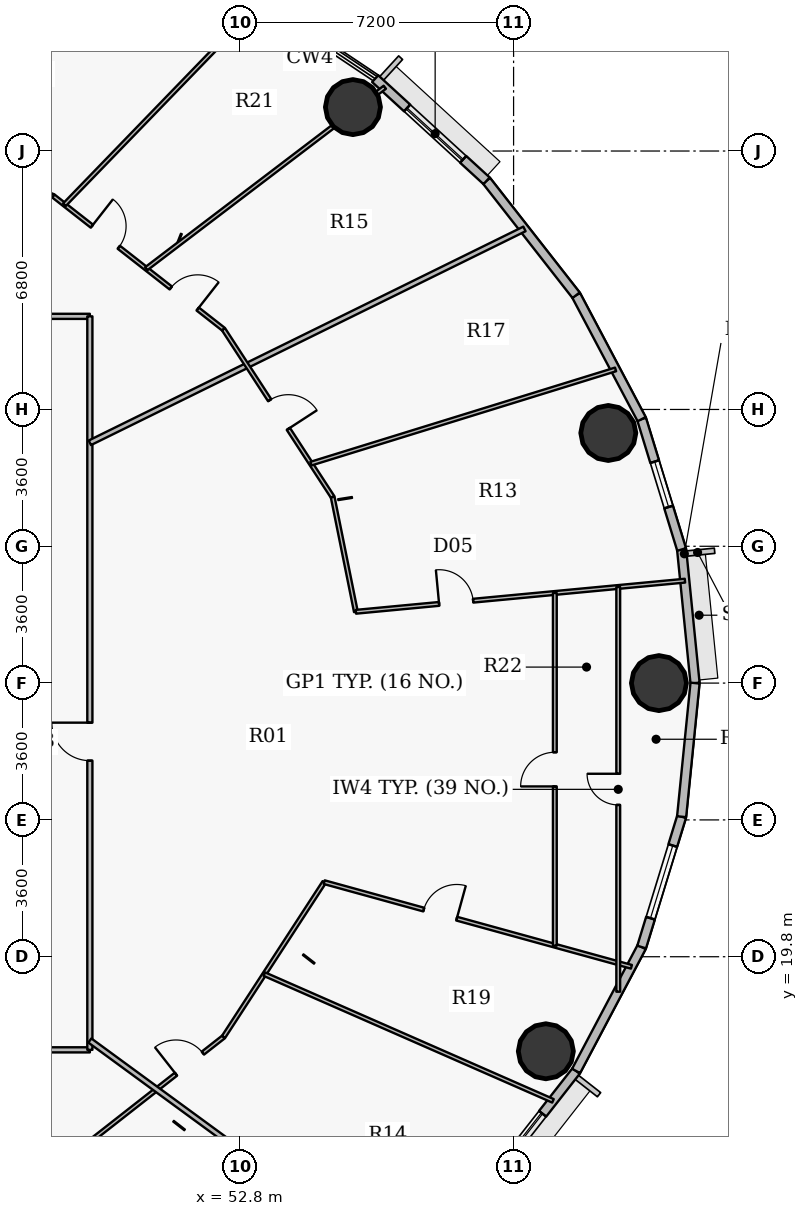
"""IFC4 building model, lengths in metres.
Left out: names, types, materials, properties, quantities, classifications, styles, units other than length and angle.
Written with IfcOpenShell. Run it as: python <this file> out.ifc"""

import sys

from ifc_helpers import new_model, si_unit, direction, frame, frame_2d, origin, origin_2d, place, context, subcontext, project, spatial, rectangle, hollow_circle, extrude, source, transform, mapped, element, fill, save


model = new_model("IFC4")
c1 = context("Model", 3, precision=1e-05, world=origin(), true_north=direction((0.0, 1.0)))
c2 = subcontext(c1, "Body", "Model", "MODEL_VIEW")
j1 = project(units=[si_unit("LENGTHUNIT", "METRE"), si_unit("PLANEANGLEUNIT", "RADIAN")], contexts=[c1])
p1 = place(None, origin())
s1 = spatial("IfcSite", under=j1, at=p1, CompositionType="ELEMENT")
p2 = place(p1, origin())
s2 = spatial("IfcBuilding", under=s1, at=p2, CompositionType="ELEMENT")
p3 = place(p2, frame((0.0, 0.0, 134.7)))
s3 = spatial("IfcBuildingStorey", under=s2, at=p3, CompositionType="ELEMENT", Elevation=134.7)
for number, where, z_axis, x_axis in (
    (1, (63.825, 27.0, 0.0), (0.0, 0.0, 1.0), (1.0, 0.0, 0.0)),
    (2, (62.493, 33.581, 0.0), (0.0, 0.0, 1.0), (1.0, 0.0, 0.0)),
    (3, (55.773, 42.156, 0.0), (0.0, 0.0, 1.0), (1.0, 0.0, 0.0)),
    (4, (60.849, 17.312, 0.0), (0.0, 0.0, 1.0), (1.0, 0.0, 0.0)),
):
    element("IfcColumn", number, at=place(p3, frame(where, z_axis=z_axis, x_axis=x_axis)), inside=s3, PredefinedType="COLUMN", context=c2, shape_type="SweptSolid", body=[
        extrude(hollow_circle(Radius=0.725, WallThickness=0.042, at=origin_2d()), origin(), (0.0, 0.0, 1.0), 3.75),
    ])
p4 = place(p3, frame((64.422, 30.515, 0.0), z_axis=(0.0, 0.0, 1.0), x_axis=(0.099989468229, -0.994988495533, 0.0)))
e5 = element("IfcWall", 5, at=p4, inside=s3, PredefinedType="SOLIDWALL", context=c2, shape_type="SweptSolid", body=[
    extrude(rectangle(XDim=3.533, YDim=0.24, at=frame_2d((1.767, 0.0))), origin(), (0.0, 0.0, 1.0), 3.5),
])
p5 = place(p3, frame((63.37, 33.945, 0.0), z_axis=(0.0, 0.0, 1.0), x_axis=(0.293124431344, -0.956074300329, 0.0)))
e6 = element("IfcWall", 6, at=p5, inside=s3, PredefinedType="SOLIDWALL", context=c2, shape_type="SweptSolid", body=[
    extrude(rectangle(XDim=3.587, YDim=0.24, at=frame_2d((1.793, 0.0))), origin(), (0.0, 0.0, 1.0), 3.5),
])
p6 = place(p5, frame((1.169, 0.0, 0.9)))
e7 = element("IfcOpeningElement", 7, at=p6, cuts=e6, PredefinedType="OPENING", context=c2, shape_type="SweptSolid", body=[
    extrude(rectangle(XDim=1.25, YDim=1.65, at=origin_2d()), frame((0.625, 0.13, 0.825), z_axis=(0.0, -1.0, 0.0), x_axis=(1.0, 0.0, 0.0)), (0.0, 0.0, 1.0), 0.26),
])
p7 = place(p3, frame((61.645, 37.206, 0.0), z_axis=(0.0, 0.0, 1.0), x_axis=(0.467614004126, -0.883932770716, 0.0)))
e8 = element("IfcWall", 8, at=p7, inside=s3, PredefinedType="SOLIDWALL", context=c2, shape_type="SweptSolid", body=[
    extrude(rectangle(XDim=3.689, YDim=0.24, at=frame_2d((1.844, 0.0))), origin(), (0.0, 0.0, 1.0), 3.5),
])
p8 = place(p3, frame((59.289, 40.217, 0.0), z_axis=(0.0, 0.0, 1.0), x_axis=(0.616272103517, -0.787533297345, 0.0)))
e9 = element("IfcWall", 9, at=p8, inside=s3, PredefinedType="SOLIDWALL", context=c2, shape_type="SweptSolid", body=[
    extrude(rectangle(XDim=3.823, YDim=0.24, at=frame_2d((1.912, 0.0))), origin(), (0.0, 0.0, 1.0), 3.5),
])
p9 = place(p3, frame((56.358, 42.903, 0.0), z_axis=(0.0, 0.0, 1.0), x_axis=(0.737113356241, -0.675769117414, 0.0)))
e10 = element("IfcWall", 10, at=p9, inside=s3, PredefinedType="SOLIDWALL", context=c2, shape_type="SweptSolid", body=[
    extrude(rectangle(XDim=3.976, YDim=0.24, at=frame_2d((1.988, 0.0))), origin(), (0.0, 0.0, 1.0), 3.5),
])
p10 = place(p9, frame((1.141, 0.0, 0.9)))
e11 = element("IfcOpeningElement", 11, at=p10, cuts=e10, PredefinedType="OPENING", context=c2, shape_type="SweptSolid", body=[
    extrude(rectangle(XDim=2.0, YDim=1.75, at=origin_2d()), frame((1.0, 0.13, 0.875), z_axis=(0.0, -1.0, 0.0), x_axis=(1.0, 0.0, 0.0)), (0.0, 0.0, 1.0), 0.26),
])
p11 = place(p3, frame((61.645, 16.794, 0.0), z_axis=(0.0, 0.0, 1.0), x_axis=(-0.616272103517, -0.787533297345, 0.0)))
e12 = element("IfcWall", 12, at=p11, inside=s3, PredefinedType="SOLIDWALL", context=c2, shape_type="SweptSolid", body=[
    extrude(rectangle(XDim=3.823, YDim=0.24, at=frame_2d((1.912, 0.0))), origin(), (0.0, 0.0, 1.0), 3.5),
])
p12 = place(p11, frame((1.43, 0.0, 0.9)))
e13 = element("IfcOpeningElement", 13, at=p12, cuts=e12, PredefinedType="OPENING", context=c2, shape_type="SweptSolid", body=[
    extrude(rectangle(XDim=1.6, YDim=1.75, at=origin_2d()), frame((0.8, 0.13, 0.875), z_axis=(0.0, -1.0, 0.0), x_axis=(1.0, 0.0, 0.0)), (0.0, 0.0, 1.0), 0.26),
])
p13 = place(p3, frame((63.37, 20.055, 0.0), z_axis=(0.0, 0.0, 1.0), x_axis=(-0.467614004126, -0.883932770716, 0.0)))
e14 = element("IfcWall", 14, at=p13, inside=s3, PredefinedType="SOLIDWALL", context=c2, shape_type="SweptSolid", body=[
    extrude(rectangle(XDim=3.689, YDim=0.24, at=frame_2d((1.844, 0.0))), origin(), (0.0, 0.0, 1.0), 3.5),
])
p14 = place(p3, frame((64.422, 23.485, 0.0), z_axis=(0.0, 0.0, 1.0), x_axis=(-0.293124431344, -0.956074300329, 0.0)))
e15 = element("IfcWall", 15, at=p14, inside=s3, PredefinedType="SOLIDWALL", context=c2, shape_type="SweptSolid", body=[
    extrude(rectangle(XDim=3.587, YDim=0.24, at=frame_2d((1.793, 0.0))), origin(), (0.0, 0.0, 1.0), 3.5),
])
p15 = place(p14, frame((0.794, 0.0, 0.9)))
e16 = element("IfcOpeningElement", 16, at=p15, cuts=e15, PredefinedType="OPENING", context=c2, shape_type="SweptSolid", body=[
    extrude(rectangle(XDim=2.0, YDim=1.75, at=origin_2d()), frame((1.0, 0.13, 0.875), z_axis=(0.0, -1.0, 0.0), x_axis=(1.0, 0.0, 0.0)), (0.0, 0.0, 1.0), 0.26),
])
p16 = place(p3, frame((64.775, 27.0, 0.0), z_axis=(0.0, 0.0, 1.0), x_axis=(-0.099989468229, -0.994988495533, 0.0)))
e17 = element("IfcWall", 17, at=p16, inside=s3, PredefinedType="SOLIDWALL", context=c2, shape_type="SweptSolid", body=[
    extrude(rectangle(XDim=3.533, YDim=0.24, at=frame_2d((1.767, 0.0))), origin(), (0.0, 0.0, 1.0), 3.5),
])
p17 = place(p3, frame((36.774, 36.65, 0.0), z_axis=(0.0, 0.0, 1.0), x_axis=(1.0, 0.0, 0.0)))
e18 = element("IfcWall", 18, at=p17, inside=s3, PredefinedType="PARTITIONING", context=c2, shape_type="SweptSolid", body=[
    extrude(rectangle(XDim=12.076, YDim=0.135, at=frame_2d((6.038, 0.0))), origin(), (0.0, 0.0, 1.0), 2.935),
])
p18 = place(p17, frame((5.538, 0.0, 0.0)))
e19 = element("IfcOpeningElement", 19, at=p18, cuts=e18, PredefinedType="OPENING", context=c2, shape_type="SweptSolid", body=[
    extrude(rectangle(XDim=1.0, YDim=2.15, at=origin_2d()), frame((0.5, 0.078, 1.075), z_axis=(0.0, -1.0, 0.0), x_axis=(1.0, 0.0, 0.0)), (0.0, 0.0, 1.0), 0.155),
])
p19 = place(p3, frame((38.477, 17.35, 0.0), z_axis=(0.0, 0.0, 1.0), x_axis=(1.0, 0.0, 0.0)))
e20 = element("IfcWall", 20, at=p19, inside=s3, PredefinedType="PARTITIONING", context=c2, shape_type="SweptSolid", body=[
    extrude(rectangle(XDim=10.373, YDim=0.135, at=frame_2d((5.187, 0.0))), origin(), (0.0, 0.0, 1.0), 2.935),
])
p20 = place(p19, frame((4.687, 0.0, 0.0)))
e21 = element("IfcOpeningElement", 21, at=p20, cuts=e20, PredefinedType="OPENING", context=c2, shape_type="SweptSolid", body=[
    extrude(rectangle(XDim=1.0, YDim=2.15, at=origin_2d()), frame((0.5, 0.078, 1.075), z_axis=(0.0, -1.0, 0.0), x_axis=(1.0, 0.0, 0.0)), (0.0, 0.0, 1.0), 0.155),
])
p21 = place(p3, frame((42.724, 41.877, 0.0), z_axis=(0.0, 0.0, 1.0), x_axis=(0.928806258388, -0.370565695093, 0.0)))
e22 = element("IfcWall", 22, at=p21, inside=s3, PredefinedType="PARTITIONING", context=c2, shape_type="SweptSolid", body=[
    extrude(rectangle(XDim=5.562, YDim=0.1, at=frame_2d((2.781, 0.0))), origin(), (0.0, 0.0, 1.0), 2.935),
])
p22 = place(p3, frame((47.891, 14.184, 0.0), z_axis=(0.0, 0.0, 1.0), x_axis=(0.787333679705, 0.616527109544, 0.0)))
e23 = element("IfcWall", 23, at=p22, inside=s3, PredefinedType="PARTITIONING", context=c2, shape_type="SweptSolid", body=[
    extrude(rectangle(XDim=5.685, YDim=0.1, at=frame_2d((2.842, 0.0))), origin(), (0.0, 0.0, 1.0), 2.935),
])
p23 = place(p22, frame((4.096, 0.0, 0.0)))
e24 = element("IfcOpeningElement", 24, at=p23, cuts=e23, PredefinedType="OPENING", context=c2, shape_type="SweptSolid", body=[
    extrude(rectangle(XDim=0.9, YDim=2.1, at=origin_2d()), frame((0.45, 0.06, 1.05), z_axis=(0.0, -1.0, 0.0), x_axis=(1.0, 0.0, 0.0)), (0.0, 0.0, 1.0), 0.12),
])
p24 = place(p3, frame((47.891, 39.816, 0.0), z_axis=(0.0, 0.0, 1.0), x_axis=(0.787347250317, -0.61650977885, 0.0)))
e25 = element("IfcWall", 25, at=p24, inside=s3, PredefinedType="PARTITIONING", context=c2, shape_type="SweptSolid", body=[
    extrude(rectangle(XDim=5.683, YDim=0.1, at=frame_2d((2.842, 0.0))), origin(), (0.0, 0.0, 1.0), 2.935),
])
p25 = place(p24, frame((3.923, 0.0, 0.0)))
e26 = element("IfcOpeningElement", 26, at=p25, cuts=e25, PredefinedType="OPENING", context=c2, shape_type="SweptSolid", body=[
    extrude(rectangle(XDim=0.9, YDim=2.1, at=origin_2d()), frame((0.45, 0.06, 1.05), z_axis=(0.0, -1.0, 0.0), x_axis=(1.0, 0.0, 0.0)), (0.0, 0.0, 1.0), 0.12),
])
p26 = place(p24, frame((1.286, 0.0, 0.0)))
e27 = element("IfcOpeningElement", 27, at=p26, cuts=e25, PredefinedType="OPENING", context=c2, shape_type="SweptSolid", body=[
    extrude(rectangle(XDim=0.9, YDim=2.1, at=origin_2d()), frame((0.45, 0.06, 1.05), z_axis=(0.0, -1.0, 0.0), x_axis=(1.0, 0.0, 0.0)), (0.0, 0.0, 1.0), 0.12),
])
p27 = place(p3, frame((48.182, 39.588, 0.0), z_axis=(0.0, 0.0, 1.0), x_axis=(0.695422522839, 0.718601081775, 0.0)))
e28 = element("IfcWall", 28, at=p27, inside=s3, PredefinedType="PARTITIONING", context=c2, shape_type="SweptSolid", body=[
    extrude(rectangle(XDim=7.426, YDim=0.1, at=frame_2d((3.713, 0.0))), origin(), (0.0, 0.0, 1.0), 2.935),
])
p28 = place(p3, frame((48.85, 17.35, 0.0), z_axis=(0.0, 0.0, 1.0), x_axis=(0.0, 1.0, 0.0)))
e29 = element("IfcWall", 29, at=p28, inside=s3, PredefinedType="PARTITIONING", context=c2, shape_type="SweptSolid", body=[
    extrude(rectangle(XDim=19.3, YDim=0.135, at=frame_2d((9.65, 0.0))), origin(), (0.0, 0.0, 1.0), 2.935),
])
p29 = place(p28, frame((7.609, 0.0, 0.0)))
e30 = element("IfcOpeningElement", 30, at=p29, cuts=e29, PredefinedType="OPENING", context=c2, shape_type="SweptSolid", body=[
    extrude(rectangle(XDim=1.0, YDim=2.15, at=origin_2d()), frame((0.5, 0.078, 1.075), z_axis=(0.0, -1.0, 0.0), x_axis=(1.0, 0.0, 0.0)), (0.0, 0.0, 1.0), 0.155),
])
p30 = place(p3, frame((48.85, 17.595, 0.0), z_axis=(0.0, 0.0, 1.0), x_axis=(0.806958414, -0.590608261096, 0.0)))
e31 = element("IfcWall", 31, at=p30, inside=s3, PredefinedType="PARTITIONING", context=c2, shape_type="SweptSolid", body=[
    extrude(rectangle(XDim=10.063, YDim=0.135, at=frame_2d((5.032, 0.0))), origin(), (0.0, 0.0, 1.0), 2.935),
])
p31 = place(p3, frame((48.85, 33.323, 0.0), z_axis=(0.0, 0.0, 1.0), x_axis=(0.897255437174, 0.44151181237, 0.0)))
e32 = element("IfcWall", 32, at=p31, inside=s3, PredefinedType="PARTITIONING", context=c2, shape_type="SweptSolid", body=[
    extrude(rectangle(XDim=12.746, YDim=0.135, at=frame_2d((6.373, 0.0))), origin(), (0.0, 0.0, 1.0), 2.935),
])
p32 = place(p3, frame((50.334, 37.903, 0.0), z_axis=(0.0, 0.0, 1.0), x_axis=(0.795918180565, 0.60540420369, 0.0)))
e33 = element("IfcWall", 33, at=p32, inside=s3, PredefinedType="PARTITIONING", context=c2, shape_type="SweptSolid", body=[
    extrude(rectangle(XDim=7.887, YDim=0.1, at=frame_2d((3.944, 0.0))), origin(), (0.0, 0.0, 1.0), 2.935),
])
p33 = place(p3, frame((52.366, 17.689, 0.0), z_axis=(0.0, 0.0, 1.0), x_axis=(0.545413870093, 0.838166874978, 0.0)))
e34 = element("IfcWall", 34, at=p33, inside=s3, PredefinedType="PARTITIONING", context=c2, shape_type="SweptSolid", body=[
    extrude(rectangle(XDim=4.859, YDim=0.1, at=frame_2d((2.43, 0.0))), origin(), (0.0, 0.0, 1.0), 2.935),
])
p34 = place(p3, frame((52.366, 36.311, 0.0), z_axis=(0.0, 0.0, 1.0), x_axis=(0.545405249109, -0.838172484781, 0.0)))
e35 = element("IfcWall", 35, at=p34, inside=s3, PredefinedType="PARTITIONING", context=c2, shape_type="SweptSolid", body=[
    extrude(rectangle(XDim=5.269, YDim=0.1, at=frame_2d((2.634, 0.0))), origin(), (0.0, 0.0, 1.0), 2.935),
])
p35 = place(p34, frame((2.228, 0.0, 0.0)))
e36 = element("IfcOpeningElement", 36, at=p35, cuts=e35, PredefinedType="OPENING", context=c2, shape_type="SweptSolid", body=[
    extrude(rectangle(XDim=0.9, YDim=2.1, at=origin_2d()), frame((0.45, 0.06, 1.05), z_axis=(0.0, -1.0, 0.0), x_axis=(1.0, 0.0, 0.0)), (0.0, 0.0, 1.0), 0.12),
])
p36 = place(p3, frame((53.442, 19.342, 0.0), z_axis=(0.0, 0.0, 1.0), x_axis=(0.91563160904, -0.402018353469, 0.0)))
e37 = element("IfcWall", 37, at=p36, inside=s3, PredefinedType="PARTITIONING", context=c2, shape_type="SweptSolid", body=[
    extrude(rectangle(XDim=8.294, YDim=0.1, at=frame_2d((4.147, 0.0))), origin(), (0.0, 0.0, 1.0), 2.935),
])
p37 = place(p3, frame((54.668, 32.774, 0.0), z_axis=(0.0, 0.0, 1.0), x_axis=(0.955345753083, 0.295490257144, 0.0)))
e38 = element("IfcWall", 38, at=p37, inside=s3, PredefinedType="PARTITIONING", context=c2, shape_type="SweptSolid", body=[
    extrude(rectangle(XDim=8.39, YDim=0.1, at=frame_2d((4.195, 0.0))), origin(), (0.0, 0.0, 1.0), 2.935),
])
p38 = place(p3, frame((55.017, 21.762, 0.0), z_axis=(0.0, 0.0, 1.0), x_axis=(0.964092156587, -0.265567907714, 0.0)))
e39 = element("IfcWall", 39, at=p38, inside=s3, PredefinedType="PARTITIONING", context=c2, shape_type="SweptSolid", body=[
    extrude(rectangle(XDim=8.385, YDim=0.1, at=frame_2d((4.192, 0.0))), origin(), (0.0, 0.0, 1.0), 2.935),
])
p39 = place(p38, frame((2.717, 0.0, 0.0)))
e40 = element("IfcOpeningElement", 40, at=p39, cuts=e39, PredefinedType="OPENING", context=c2, shape_type="SweptSolid", body=[
    extrude(rectangle(XDim=0.9, YDim=2.1, at=origin_2d()), frame((0.45, 0.06, 1.05), z_axis=(0.0, -1.0, 0.0), x_axis=(1.0, 0.0, 0.0)), (0.0, 0.0, 1.0), 0.12),
])
p40 = place(p3, frame((55.24, 31.895, 0.0), z_axis=(0.0, 0.0, 1.0), x_axis=(0.198189059207, -0.980163811213, 0.0)))
e41 = element("IfcWall", 41, at=p40, inside=s3, PredefinedType="PARTITIONING", context=c2, shape_type="SweptSolid", body=[
    extrude(rectangle(XDim=3.08, YDim=0.1, at=frame_2d((1.54, 0.0))), origin(), (0.0, 0.0, 1.0), 2.935),
])
p41 = place(p3, frame((55.85, 28.876, 0.0), z_axis=(0.0, 0.0, 1.0), x_axis=(0.995563342767, 0.094093732729, 0.0)))
e42 = element("IfcWall", 42, at=p41, inside=s3, PredefinedType="PARTITIONING", context=c2, shape_type="SweptSolid", body=[
    extrude(rectangle(XDim=8.697, YDim=0.1, at=frame_2d((4.349, 0.0))), origin(), (0.0, 0.0, 1.0), 2.935),
])
p42 = place(p41, frame((2.199, 0.0, 0.0)))
e43 = element("IfcOpeningElement", 43, at=p42, cuts=e42, PredefinedType="OPENING", context=c2, shape_type="SweptSolid", body=[
    extrude(rectangle(XDim=0.9, YDim=2.1, at=origin_2d()), frame((0.45, 0.06, 1.05), z_axis=(0.0, -1.0, 0.0), x_axis=(1.0, 0.0, 0.0)), (0.0, 0.0, 1.0), 0.12),
])
p43 = place(p3, frame((61.085, 20.09, 0.0), z_axis=(0.0, 0.0, 1.0), x_axis=(0.0, 1.0, 0.0)))
e44 = element("IfcWall", 44, at=p43, inside=s3, PredefinedType="PARTITIONING", context=c2, shape_type="SweptSolid", body=[
    extrude(rectangle(XDim=9.281, YDim=0.1, at=frame_2d((4.641, 0.0))), origin(), (0.0, 0.0, 1.0), 2.935),
])
p44 = place(p43, frame((4.19, 0.0, 0.0)))
e45 = element("IfcOpeningElement", 45, at=p44, cuts=e44, PredefinedType="OPENING", context=c2, shape_type="SweptSolid", body=[
    extrude(rectangle(XDim=0.9, YDim=2.1, at=origin_2d()), frame((0.45, 0.06, 1.05), z_axis=(0.0, -1.0, 0.0), x_axis=(1.0, 0.0, 0.0)), (0.0, 0.0, 1.0), 0.12),
])
p45 = place(p3, frame((62.754, 18.88, 0.0), z_axis=(0.0, 0.0, 1.0), x_axis=(0.0, 1.0, 0.0)))
e46 = element("IfcWall", 46, at=p45, inside=s3, PredefinedType="PARTITIONING", context=c2, shape_type="SweptSolid", body=[
    extrude(rectangle(XDim=10.649, YDim=0.1, at=frame_2d((5.325, 0.0))), origin(), (0.0, 0.0, 1.0), 2.935),
])
p46 = place(p45, frame((4.915, 0.0, 0.0)))
e47 = element("IfcOpeningElement", 47, at=p46, cuts=e46, PredefinedType="OPENING", context=c2, shape_type="SweptSolid", body=[
    extrude(rectangle(XDim=0.82, YDim=2.1, at=origin_2d()), frame((0.41, 0.06, 1.05), z_axis=(0.0, -1.0, 0.0), x_axis=(1.0, 0.0, 0.0)), (0.0, 0.0, 1.0), 0.12),
])
m1 = source(origin(), c2, "Body", "SweptSolid", [
    extrude(rectangle(XDim=2.0, YDim=1.75, at=origin_2d()), frame((1.0, 0.03, 0.875), z_axis=(0.0, -1.0, 0.0), x_axis=(1.0, 0.0, 0.0)), (0.0, 0.0, 1.0), 0.06),
])
p47 = place(p10, origin())
e48 = element("IfcWindow", 48, at=p47, inside=s3, PartitioningType="DOUBLE_PANEL_VERTICAL", PredefinedType="WINDOW", context=c2, shape_type="MappedRepresentation", body=[
    mapped(m1, transform((0.0, 0.0, 0.0), x_axis=(1.0, 0.0, 0.0), y_axis=(0.0, 1.0, 0.0), z_axis=(0.0, 0.0, 1.0), scale=1.0)),
])
fill(e11, e48)
m2 = source(origin(), c2, "Body", "SweptSolid", [
    extrude(rectangle(XDim=1.6, YDim=1.75, at=origin_2d()), frame((0.8, 0.03, 0.875), z_axis=(0.0, -1.0, 0.0), x_axis=(1.0, 0.0, 0.0)), (0.0, 0.0, 1.0), 0.06),
])
p48 = place(p12, origin())
e49 = element("IfcWindow", 49, at=p48, inside=s3, PartitioningType="DOUBLE_PANEL_VERTICAL", PredefinedType="WINDOW", context=c2, shape_type="MappedRepresentation", body=[
    mapped(m2, transform((0.0, 0.0, 0.0), x_axis=(1.0, 0.0, 0.0), y_axis=(0.0, 1.0, 0.0), z_axis=(0.0, 0.0, 1.0), scale=1.0)),
])
fill(e13, e49)
p49 = place(p15, origin())
e50 = element("IfcWindow", 50, at=p49, inside=s3, PartitioningType="DOUBLE_PANEL_VERTICAL", PredefinedType="WINDOW", context=c2, shape_type="MappedRepresentation", body=[
    mapped(m1, transform((0.0, 0.0, 0.0), x_axis=(1.0, 0.0, 0.0), y_axis=(0.0, 1.0, 0.0), z_axis=(0.0, 0.0, 1.0), scale=1.0)),
])
fill(e16, e50)
m3 = source(origin(), c2, "Body", "SweptSolid", [
    extrude(rectangle(XDim=1.25, YDim=1.65, at=origin_2d()), frame((0.625, 0.03, 0.825), z_axis=(0.0, -1.0, 0.0), x_axis=(1.0, 0.0, 0.0)), (0.0, 0.0, 1.0), 0.06),
])
p50 = place(p6, origin())
e51 = element("IfcWindow", 51, at=p50, inside=s3, PartitioningType="SINGLE_PANEL", PredefinedType="WINDOW", context=c2, shape_type="MappedRepresentation", body=[
    mapped(m3, transform((0.0, 0.0, 0.0), x_axis=(1.0, 0.0, 0.0), y_axis=(0.0, 1.0, 0.0), z_axis=(0.0, 0.0, 1.0), scale=1.0)),
])
fill(e7, e51)
m4 = source(origin(), c2, "Body", "SweptSolid", [
    extrude(rectangle(XDim=1.0, YDim=2.15, at=origin_2d()), frame((0.5, 0.025, 1.075), z_axis=(0.0, -1.0, 0.0), x_axis=(1.0, 0.0, 0.0)), (0.0, 0.0, 1.0), 0.05),
])
p51 = place(p29, origin())
e52 = element("IfcDoor", 52, at=p51, inside=s3, OperationType="SINGLE_SWING_RIGHT", PredefinedType="DOOR", context=c2, shape_type="MappedRepresentation", body=[
    mapped(m4, transform((0.0, 0.0, 0.0), x_axis=(1.0, 0.0, 0.0), y_axis=(0.0, 1.0, 0.0), z_axis=(0.0, 0.0, 1.0), scale=1.0)),
])
fill(e30, e52)
m5 = source(origin(), c2, "Body", "SweptSolid", [
    extrude(rectangle(XDim=0.9, YDim=2.1, at=origin_2d()), frame((0.45, 0.025, 1.05), z_axis=(0.0, -1.0, 0.0), x_axis=(1.0, 0.0, 0.0)), (0.0, 0.0, 1.0), 0.05),
])
p52 = place(p23, origin())
e53 = element("IfcDoor", 53, at=p52, inside=s3, OperationType="SINGLE_SWING_LEFT", PredefinedType="DOOR", context=c2, shape_type="MappedRepresentation", body=[
    mapped(m5, transform((0.0, 0.0, 0.0), x_axis=(1.0, 0.0, 0.0), y_axis=(0.0, 1.0, 0.0), z_axis=(0.0, 0.0, 1.0), scale=1.0)),
])
fill(e24, e53)
p53 = place(p39, origin())
e54 = element("IfcDoor", 54, at=p53, inside=s3, OperationType="SINGLE_SWING_RIGHT", PredefinedType="DOOR", context=c2, shape_type="MappedRepresentation", body=[
    mapped(m5, transform((0.0, 0.0, 0.0), x_axis=(1.0, 0.0, 0.0), y_axis=(0.0, 1.0, 0.0), z_axis=(0.0, 0.0, 1.0), scale=1.0)),
])
fill(e40, e54)
p54 = place(p42, origin())
e55 = element("IfcDoor", 55, at=p54, inside=s3, OperationType="SINGLE_SWING_LEFT", PredefinedType="DOOR", context=c2, shape_type="MappedRepresentation", body=[
    mapped(m5, transform((0.0, 0.0, 0.0), x_axis=(1.0, 0.0, 0.0), y_axis=(0.0, 1.0, 0.0), z_axis=(0.0, 0.0, 1.0), scale=1.0)),
])
fill(e43, e55)
p55 = place(p35, origin())
e56 = element("IfcDoor", 56, at=p55, inside=s3, OperationType="SINGLE_SWING_RIGHT", PredefinedType="DOOR", context=c2, shape_type="MappedRepresentation", body=[
    mapped(m5, transform((0.0, 0.0, 0.0), x_axis=(1.0, 0.0, 0.0), y_axis=(0.0, 1.0, 0.0), z_axis=(0.0, 0.0, 1.0), scale=1.0)),
])
fill(e36, e56)
p56 = place(p44, origin())
e57 = element("IfcDoor", 57, at=p56, inside=s3, OperationType="SINGLE_SWING_LEFT", PredefinedType="DOOR", context=c2, shape_type="MappedRepresentation", body=[
    mapped(m5, transform((0.0, 0.0, 0.0), x_axis=(1.0, 0.0, 0.0), y_axis=(0.0, 1.0, 0.0), z_axis=(0.0, 0.0, 1.0), scale=1.0)),
])
fill(e45, e57)
m6 = source(origin(), c2, "Body", "SweptSolid", [
    extrude(rectangle(XDim=0.82, YDim=2.1, at=origin_2d()), frame((0.41, 0.025, 1.05), z_axis=(0.0, -1.0, 0.0), x_axis=(1.0, 0.0, 0.0)), (0.0, 0.0, 1.0), 0.05),
])
p57 = place(p46, origin())
e58 = element("IfcDoor", 58, at=p57, inside=s3, OperationType="SINGLE_SWING_RIGHT", PredefinedType="DOOR", context=c2, shape_type="MappedRepresentation", body=[
    mapped(m6, transform((0.0, 0.0, 0.0), x_axis=(1.0, 0.0, 0.0), y_axis=(0.0, 1.0, 0.0), z_axis=(0.0, 0.0, 1.0), scale=1.0)),
])
fill(e47, e58)
p58 = place(p25, origin())
e59 = element("IfcDoor", 59, at=p58, inside=s3, OperationType="SINGLE_SWING_RIGHT", PredefinedType="DOOR", context=c2, shape_type="MappedRepresentation", body=[
    mapped(m5, transform((0.0, 0.0, 0.0), x_axis=(1.0, 0.0, 0.0), y_axis=(0.0, 1.0, 0.0), z_axis=(0.0, 0.0, 1.0), scale=1.0)),
])
fill(e26, e59)
p59 = place(p26, origin())
e60 = element("IfcDoor", 60, at=p59, inside=s3, OperationType="SINGLE_SWING_LEFT", PredefinedType="DOOR", context=c2, shape_type="MappedRepresentation", body=[
    mapped(m5, transform((0.0, 0.0, 0.0), x_axis=(1.0, 0.0, 0.0), y_axis=(0.0, 1.0, 0.0), z_axis=(0.0, 0.0, 1.0), scale=1.0)),
])
fill(e27, e60)
save(model, sys.argv[1])
